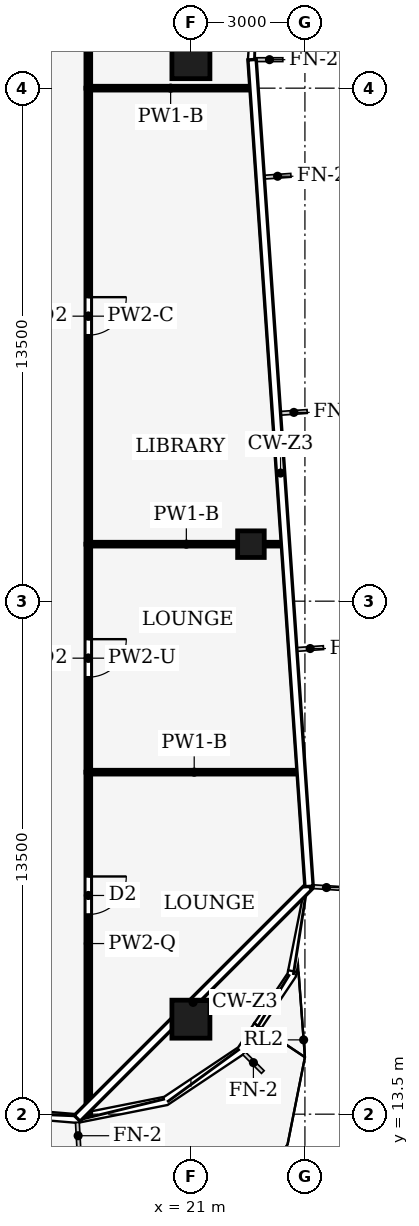
"""IFC4 building model, lengths in metres.
Left out: names, types, materials, properties, quantities, classifications, styles, units other than length and angle.
Written with IfcOpenShell. Run it as: python <this file> out.ifc"""

import sys

from ifc_helpers import new_model, si_unit, direction, frame, frame_2d, origin, origin_2d, place, context, subcontext, project, spatial, rectangle, hollow_rectangle, extrude, element, fill, save


model = new_model("IFC4")
c1 = context("Model", 3, precision=1e-05, world=origin(), true_north=direction((0.0, 1.0)))
c2 = subcontext(c1, "Body", "Model", "MODEL_VIEW")
j1 = project(units=[si_unit("LENGTHUNIT", "METRE"), si_unit("PLANEANGLEUNIT", "RADIAN")], contexts=[c1])
p1 = place(None, origin())
s1 = spatial("IfcSite", under=j1, at=p1, CompositionType="ELEMENT")
p2 = place(p1, origin())
s2 = spatial("IfcBuilding", under=s1, at=p2, CompositionType="ELEMENT")
p3 = place(p2, frame((0.0, 0.0, 177.0)))
s3 = spatial("IfcBuildingStorey", under=s2, at=p3, CompositionType="ELEMENT", Elevation=177.0)
for number, where, z_axis, x_axis in (
    (1, (21.0, 41.25, 0.0), (0.0, 0.0, 1.0), (1.0, 0.0, 0.0)),
    (2, (21.0, 16.0, 0.0), (0.0, 0.0, 1.0), (1.0, 0.0, 0.0)),
):
    element("IfcColumn", number, at=place(p3, frame(where, z_axis=z_axis, x_axis=x_axis)), inside=s3, PredefinedType="COLUMN", context=c2, shape_type="SweptSolid", body=[
        extrude(hollow_rectangle(XDim=1.0, YDim=1.0, WallThickness=0.06, at=origin_2d()), origin(), (0.0, 0.0, 1.0), 5.0),
    ])
p4 = place(p3, frame((22.579, 28.5, 0.0), z_axis=(0.0, 0.0, 1.0), x_axis=(1.0, 0.0, 0.0)))
e3 = element("IfcColumn", 3, at=p4, inside=s3, PredefinedType="COLUMN", context=c2, shape_type="SweptSolid", body=[
    extrude(hollow_rectangle(XDim=0.7, YDim=0.7, WallThickness=0.03, at=origin_2d()), origin(), (0.0, 0.0, 1.0), 5.0),
])
p5 = place(p3, frame((18.3, 22.5, 0.0), z_axis=(0.0, 0.0, 1.0), x_axis=(0.0, -1.0, 0.0)))
e4 = element("IfcWall", 4, at=p5, inside=s3, PredefinedType="PARTITIONING", context=c2, shape_type="SweptSolid", body=[
    extrude(rectangle(XDim=9.02, YDim=0.125, at=frame_2d((4.51, 0.0))), origin(), (0.0, 0.0, 1.0), 3.93),
])
p6 = place(p5, frame((2.745, 0.0, 0.0)))
e5 = element("IfcOpeningElement", 5, at=p6, cuts=e4, PredefinedType="OPENING", context=c2, shape_type="SweptSolid", body=[
    extrude(rectangle(XDim=1.0, YDim=2.1, at=frame_2d((0.5, 1.05))), frame((0.0, 0.073, 0.0), z_axis=(0.0, -1.0, 0.0), x_axis=(1.0, 0.0, 0.0)), (0.0, 0.0, 1.0), 0.145),
])
p7 = place(p3, frame((18.3, 28.5, 0.0), z_axis=(0.0, 0.0, 1.0), x_axis=(0.0, -1.0, 0.0)))
e6 = element("IfcWall", 6, at=p7, inside=s3, PredefinedType="PARTITIONING", context=c2, shape_type="SweptSolid", body=[
    extrude(rectangle(XDim=6.0, YDim=0.125, at=frame_2d((3.0, 0.0))), origin(), (0.0, 0.0, 1.0), 4.44),
])
p8 = place(p7, frame((2.5, 0.0, 0.0)))
e7 = element("IfcOpeningElement", 7, at=p8, cuts=e6, PredefinedType="OPENING", context=c2, shape_type="SweptSolid", body=[
    extrude(rectangle(XDim=1.0, YDim=2.1, at=frame_2d((0.5, 1.05))), frame((0.0, 0.073, 0.0), z_axis=(0.0, -1.0, 0.0), x_axis=(1.0, 0.0, 0.0)), (0.0, 0.0, 1.0), 0.145),
])
p9 = place(p3, frame((18.3, 40.5, 0.0), z_axis=(0.0, 0.0, 1.0), x_axis=(0.0, -1.0, 0.0)))
e8 = element("IfcWall", 8, at=p9, inside=s3, PredefinedType="PARTITIONING", context=c2, shape_type="SweptSolid", body=[
    extrude(rectangle(XDim=12.0, YDim=0.125, at=frame_2d((6.0, 0.0))), origin(), (0.0, 0.0, 1.0), 4.14),
])
p10 = place(p9, frame((5.5, 0.0, 0.0)))
e9 = element("IfcOpeningElement", 9, at=p10, cuts=e8, PredefinedType="OPENING", context=c2, shape_type="SweptSolid", body=[
    extrude(rectangle(XDim=1.0, YDim=2.1, at=frame_2d((0.5, 1.05))), frame((0.0, 0.073, 0.0), z_axis=(0.0, -1.0, 0.0), x_axis=(1.0, 0.0, 0.0)), (0.0, 0.0, 1.0), 0.145),
])
p11 = place(p3, frame((18.3, 43.304, 0.0), z_axis=(0.0, 0.0, 1.0), x_axis=(0.0, -1.0, 0.0)))
e10 = element("IfcWall", 10, at=p11, inside=s3, PredefinedType="PARTITIONING", context=c2, shape_type="SweptSolid", body=[
    extrude(rectangle(XDim=2.804, YDim=0.125, at=frame_2d((1.402, 0.0))), origin(), (0.0, 0.0, 1.0), 4.87),
])
p12 = place(p11, frame((0.502, 0.0, 0.0)))
e11 = element("IfcOpeningElement", 11, at=p12, cuts=e10, PredefinedType="OPENING", context=c2, shape_type="SweptSolid", body=[
    extrude(rectangle(XDim=1.0, YDim=2.1, at=frame_2d((0.5, 1.05))), frame((0.0, 0.073, 0.0), z_axis=(0.0, -1.0, 0.0), x_axis=(1.0, 0.0, 0.0)), (0.0, 0.0, 1.0), 0.145),
])
p13 = place(p3, frame((23.873, 22.5, 0.0), z_axis=(0.0, 0.0, 1.0), x_axis=(-1.0, 0.0, 0.0)))
e12 = element("IfcWall", 12, at=p13, inside=s3, PredefinedType="PARTITIONING", context=c2, shape_type="SweptSolid", body=[
    extrude(rectangle(XDim=5.573, YDim=0.1, at=frame_2d((2.787, 0.0))), origin(), (0.0, 0.0, 1.0), 4.04),
])
p14 = place(p3, frame((23.459, 28.5, 0.0), z_axis=(0.0, 0.0, 1.0), x_axis=(-1.0, 0.0, 0.0)))
e13 = element("IfcWall", 13, at=p14, inside=s3, PredefinedType="PARTITIONING", context=c2, shape_type="SweptSolid", body=[
    extrude(rectangle(XDim=5.159, YDim=0.1, at=frame_2d((2.58, 0.0))), origin(), (0.0, 0.0, 1.0), 4.04),
])
p15 = place(p3, frame((22.632, 40.5, 0.0), z_axis=(0.0, 0.0, 1.0), x_axis=(-1.0, 0.0, 0.0)))
e14 = element("IfcWall", 14, at=p15, inside=s3, PredefinedType="PARTITIONING", context=c2, shape_type="SweptSolid", body=[
    extrude(rectangle(XDim=4.332, YDim=0.1, at=frame_2d((2.166, 0.0))), origin(), (0.0, 0.0, 1.0), 4.04),
])
p16 = place(p6, origin())
e15 = element("IfcDoor", 15, at=p16, inside=s3, OperationType="SINGLE_SWING_LEFT", PredefinedType="DOOR", context=c2, shape_type="SweptSolid", body=[
    extrude(rectangle(XDim=1.0, YDim=2.1, at=frame_2d((0.5, 1.05))), frame((0.0, 0.025, 0.0), z_axis=(0.0, -1.0, 0.0), x_axis=(1.0, 0.0, 0.0)), (0.0, 0.0, 1.0), 0.05),
])
fill(e5, e15)
p17 = place(p8, origin())
e16 = element("IfcDoor", 16, at=p17, inside=s3, OperationType="SINGLE_SWING_RIGHT", PredefinedType="DOOR", context=c2, shape_type="SweptSolid", body=[
    extrude(rectangle(XDim=1.0, YDim=2.1, at=frame_2d((0.5, 1.05))), frame((0.0, 0.025, 0.0), z_axis=(0.0, -1.0, 0.0), x_axis=(1.0, 0.0, 0.0)), (0.0, 0.0, 1.0), 0.05),
])
fill(e7, e16)
p18 = place(p10, origin())
e17 = element("IfcDoor", 17, at=p18, inside=s3, OperationType="SINGLE_SWING_LEFT", PredefinedType="DOOR", context=c2, shape_type="SweptSolid", body=[
    extrude(rectangle(XDim=1.0, YDim=2.1, at=frame_2d((0.5, 1.05))), frame((0.0, 0.025, 0.0), z_axis=(0.0, -1.0, 0.0), x_axis=(1.0, 0.0, 0.0)), (0.0, 0.0, 1.0), 0.05),
])
fill(e9, e17)
save(model, sys.argv[1])
